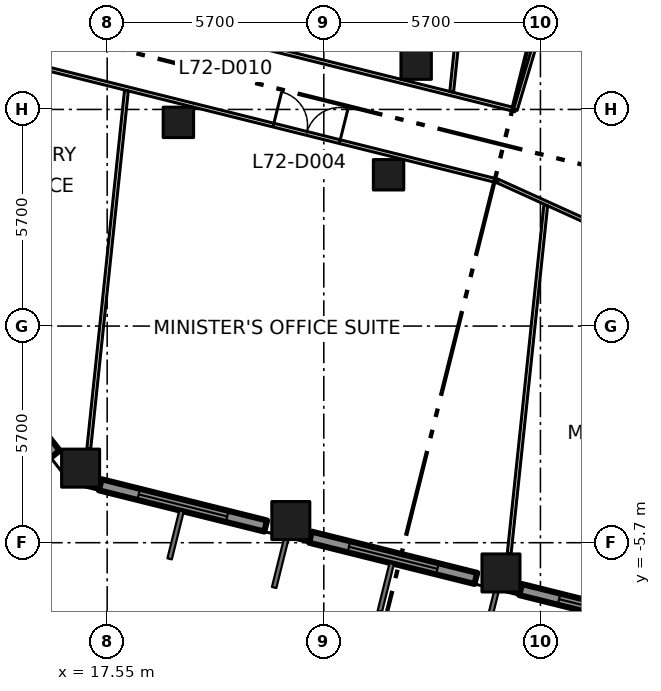
"""IFC4 building model, lengths in metres.
Left out: names, types, materials, properties, quantities, classifications, styles, units other than length and angle.
Written with IfcOpenShell. Run it as: python <this file> out.ifc"""

import sys

from ifc_helpers import new_model, si_unit, direction, frame, frame_2d, origin, origin_2d, place, context, subcontext, project, spatial, rectangle, extrude, element, fill, save


model = new_model("IFC4")
c1 = context("Model", 3, precision=1e-05, world=origin(), true_north=direction((0.0, 1.0)))
c2 = subcontext(c1, "Body", "Model", "MODEL_VIEW")
j1 = project(units=[si_unit("LENGTHUNIT", "METRE"), si_unit("PLANEANGLEUNIT", "RADIAN")], contexts=[c1])
p1 = place(None, origin())
s1 = spatial("IfcSite", under=j1, at=p1, CompositionType="ELEMENT")
p2 = place(p1, origin())
s2 = spatial("IfcBuilding", under=s1, at=p2, CompositionType="ELEMENT")
p3 = place(p2, frame((0.0, 0.0, 315.0)))
s3 = spatial("IfcBuildingStorey", under=s2, at=p3, CompositionType="ELEMENT", Elevation=315.0)
for number, where, z_axis, x_axis in (
    (1, (16.851, -3.738, 0.0), (0.0, 0.0, 1.0), (1.0, 0.0, 0.0)),
    (2, (22.382, -5.117, 0.0), (0.0, 0.0, 1.0), (1.0, 0.0, 0.0)),
    (3, (27.912, -6.496, 0.0), (0.0, 0.0, 1.0), (1.0, 0.0, 0.0)),
):
    element("IfcColumn", number, at=place(p3, frame(where, z_axis=z_axis, x_axis=x_axis)), inside=s3, PredefinedType="COLUMN", context=c2, shape_type="SweptSolid", body=[
        extrude(rectangle(XDim=1.0, YDim=1.0, at=origin_2d()), origin(), (0.0, 0.0, 1.0), 4.2),
    ])
for number, where, z_axis, x_axis in (
    (4, (19.424, 5.36, 0.0), (0.0, 0.0, 1.0), (1.0, 0.0, 0.0)),
    (5, (24.954, 3.981, 0.0), (0.0, 0.0, 1.0), (1.0, 0.0, 0.0)),
    (6, (25.68, 6.892, 0.0), (0.0, 0.0, 1.0), (1.0, 0.0, 0.0)),
):
    element("IfcColumn", number, at=place(p3, frame(where, z_axis=z_axis, x_axis=x_axis)), inside=s3, PredefinedType="COLUMN", context=c2, shape_type="SweptSolid", body=[
        extrude(rectangle(XDim=0.8, YDim=0.8, at=origin_2d()), origin(), (0.0, 0.0, 1.0), 4.2),
    ])
p4 = place(p3, frame((13.538, 0.016, 0.0), z_axis=(0.0, 0.0, 1.0), x_axis=(0.615713519567, -0.787970089421, 0.0)))
e7 = element("IfcWall", 7, at=p4, inside=s3, PredefinedType="SOLIDWALL", context=c2, shape_type="SweptSolid", body=[
    extrude(rectangle(XDim=4.296, YDim=0.3, at=frame_2d((2.148, 0.0))), origin(), (0.0, 0.0, 1.0), 3.2),
])
p5 = place(p4, frame((0.948, 0.0, 0.8)))
e8 = element("IfcOpeningElement", 8, at=p5, cuts=e7, PredefinedType="OPENING", context=c2, shape_type="SweptSolid", body=[
    extrude(rectangle(XDim=2.4, YDim=2.1, at=frame_2d((1.2, 1.05))), frame((0.0, 0.16, 0.0), z_axis=(0.0, -1.0, 0.0), x_axis=(1.0, 0.0, 0.0)), (0.0, 0.0, 1.0), 0.32),
])
p6 = place(p3, frame((17.367, -4.176, 0.0), z_axis=(0.0, 0.0, 1.0), x_axis=(0.970327846266, -0.241793032904, 0.0)))
e9 = element("IfcWall", 9, at=p6, inside=s3, PredefinedType="SOLIDWALL", context=c2, shape_type="SweptSolid", body=[
    extrude(rectangle(XDim=4.487, YDim=0.3, at=frame_2d((2.244, 0.0))), origin(), (0.0, 0.0, 1.0), 3.2),
])
p7 = place(p6, frame((1.044, 0.0, 0.8)))
e10 = element("IfcOpeningElement", 10, at=p7, cuts=e9, PredefinedType="OPENING", context=c2, shape_type="SweptSolid", body=[
    extrude(rectangle(XDim=2.4, YDim=2.1, at=frame_2d((1.2, 1.05))), frame((0.0, 0.16, 0.0), z_axis=(0.0, -1.0, 0.0), x_axis=(1.0, 0.0, 0.0)), (0.0, 0.0, 1.0), 0.32),
])
p8 = place(p3, frame((22.898, -5.555, 0.0), z_axis=(0.0, 0.0, 1.0), x_axis=(0.970315118421, -0.24184410467, 0.0)))
e11 = element("IfcWall", 11, at=p8, inside=s3, PredefinedType="SOLIDWALL", context=c2, shape_type="SweptSolid", body=[
    extrude(rectangle(XDim=4.486, YDim=0.3, at=frame_2d((2.243, 0.0))), origin(), (0.0, 0.0, 1.0), 3.2),
])
p9 = place(p8, frame((1.044, 0.0, 0.8)))
e12 = element("IfcOpeningElement", 12, at=p9, cuts=e11, PredefinedType="OPENING", context=c2, shape_type="SweptSolid", body=[
    extrude(rectangle(XDim=2.4, YDim=2.1, at=frame_2d((1.2, 1.05))), frame((0.0, 0.16, 0.0), z_axis=(0.0, -1.0, 0.0), x_axis=(1.0, 0.0, 0.0)), (0.0, 0.0, 1.0), 0.32),
])
p10 = place(p3, frame((28.428, -6.933, 0.0), z_axis=(0.0, 0.0, 1.0), x_axis=(0.970276766004, -0.241997928406, 0.0)))
e13 = element("IfcWall", 13, at=p10, inside=s3, PredefinedType="SOLIDWALL", context=c2, shape_type="SweptSolid", body=[
    extrude(rectangle(XDim=4.487, YDim=0.3, at=frame_2d((2.244, 0.0))), origin(), (0.0, 0.0, 1.0), 3.2),
])
p11 = place(p10, frame((1.044, 0.0, 0.8)))
e14 = element("IfcOpeningElement", 14, at=p11, cuts=e13, PredefinedType="OPENING", context=c2, shape_type="SweptSolid", body=[
    extrude(rectangle(XDim=2.4, YDim=2.1, at=frame_2d((1.2, 1.05))), frame((0.0, 0.16, 0.0), z_axis=(0.0, -1.0, 0.0), x_axis=(1.0, 0.0, 0.0)), (0.0, 0.0, 1.0), 0.32),
])
p12 = place(p3, frame((8.535, 8.626, 0.0), z_axis=(0.0, 0.0, 1.0), x_axis=(0.970298340477, -0.241911410372, 0.0)))
e15 = element("IfcWall", 15, at=p12, inside=s3, PredefinedType="PARTITIONING", context=c2, shape_type="SweptSolid", body=[
    extrude(rectangle(XDim=19.88, YDim=0.1, at=frame_2d((9.94, 0.0))), origin(), (0.0, 0.0, 1.0), 3.9),
])
p13 = place(p12, frame((13.799, 0.0, 0.0)))
e16 = element("IfcOpeningElement", 16, at=p13, cuts=e15, PredefinedType="OPENING", context=c2, shape_type="SweptSolid", body=[
    extrude(rectangle(XDim=1.8, YDim=2.1, at=frame_2d((0.9, 1.05))), frame((0.0, 0.06, 0.0), z_axis=(0.0, -1.0, 0.0), x_axis=(1.0, 0.0, 0.0)), (0.0, 0.0, 1.0), 0.12),
])
p14 = place(p12, frame((4.38, 0.0, 0.0)))
e17 = element("IfcOpeningElement", 17, at=p14, cuts=e15, PredefinedType="OPENING", context=c2, shape_type="SweptSolid", body=[
    extrude(rectangle(XDim=1.0, YDim=2.1, at=frame_2d((0.5, 1.05))), frame((0.0, 0.06, 0.0), z_axis=(0.0, -1.0, 0.0), x_axis=(1.0, 0.0, 0.0)), (0.0, 0.0, 1.0), 0.12),
])
p15 = place(p3, frame((9.002, 10.499, 0.0), z_axis=(0.0, 0.0, 1.0), x_axis=(0.970298340477, -0.241911410372, 0.0)))
e18 = element("IfcWall", 18, at=p15, inside=s3, PredefinedType="PARTITIONING", context=c2, shape_type="SweptSolid", body=[
    extrude(rectangle(XDim=19.88, YDim=0.1, at=frame_2d((9.94, 0.0))), origin(), (0.0, 0.0, 1.0), 3.9),
])
p16 = place(p15, frame((12.518, 0.0, 0.0)))
e19 = element("IfcOpeningElement", 19, at=p16, cuts=e18, PredefinedType="OPENING", context=c2, shape_type="SweptSolid", body=[
    extrude(rectangle(XDim=1.0, YDim=2.1, at=frame_2d((0.5, 1.05))), frame((0.0, 0.06, 0.0), z_axis=(0.0, -1.0, 0.0), x_axis=(1.0, 0.0, 0.0)), (0.0, 0.0, 1.0), 0.12),
])
p17 = place(p3, frame((27.824, 3.817, 0.0), z_axis=(0.0, 0.0, 1.0), x_axis=(0.910793734201, -0.41286168839, 0.0)))
e20 = element("IfcWall", 20, at=p17, inside=s3, PredefinedType="PARTITIONING", context=c2, shape_type="SweptSolid", body=[
    extrude(rectangle(XDim=2.482, YDim=0.1, at=frame_2d((1.241, 0.0))), origin(), (0.0, 0.0, 1.0), 3.9),
])
p18 = place(p3, frame((30.8, 14.1, 0.0), z_axis=(0.0, 0.0, 1.0), x_axis=(-0.28588265334, -0.958264633867, 0.0)))
e21 = element("IfcWall", 21, at=p18, inside=s3, PredefinedType="PARTITIONING", context=c2, shape_type="SweptSolid", body=[
    extrude(rectangle(XDim=8.776, YDim=0.1, at=frame_2d((4.388, 0.0))), origin(), (0.0, 0.0, 1.0), 3.9),
])
p19 = place(p18, frame((3.68, 0.0, 0.0)))
e22 = element("IfcOpeningElement", 22, at=p19, cuts=e21, PredefinedType="OPENING", context=c2, shape_type="SweptSolid", body=[
    extrude(rectangle(XDim=1.0, YDim=2.1, at=frame_2d((0.5, 1.05))), frame((0.0, 0.06, 0.0), z_axis=(0.0, -1.0, 0.0), x_axis=(1.0, 0.0, 0.0)), (0.0, 0.0, 1.0), 0.12),
])
p20 = place(p3, frame((17.065, -3.238, 0.0), z_axis=(0.0, 0.0, 1.0), x_axis=(0.104487801341, 0.994526168269, 0.0)))
e23 = element("IfcWall", 23, at=p20, inside=s3, PredefinedType="PARTITIONING", context=c2, shape_type="SweptSolid", body=[
    extrude(rectangle(XDim=9.484, YDim=0.1, at=frame_2d((4.742, 0.0))), origin(), (0.0, 0.0, 1.0), 3.9),
])
p21 = place(p3, frame((26.615, 6.166, 0.0), z_axis=(0.0, 0.0, 1.0), x_axis=(0.10453822663, 0.994520869149, 0.0)))
e24 = element("IfcWall", 24, at=p21, inside=s3, PredefinedType="PARTITIONING", context=c2, shape_type="SweptSolid", body=[
    extrude(rectangle(XDim=7.978, YDim=0.1, at=frame_2d((3.989, 0.0))), origin(), (0.0, 0.0, 1.0), 3.9),
])
p22 = place(p3, frame((28.127, -5.996, 0.0), z_axis=(0.0, 0.0, 1.0), x_axis=(0.104490376754, 0.994525897685, 0.0)))
e25 = element("IfcWall", 25, at=p22, inside=s3, PredefinedType="PARTITIONING", context=c2, shape_type="SweptSolid", body=[
    extrude(rectangle(XDim=9.218, YDim=0.1, at=frame_2d((4.609, 0.0))), origin(), (0.0, 0.0, 1.0), 3.9),
])
p23 = place(p7, origin())
e26 = element("IfcWindow", 26, at=p23, inside=s3, PartitioningType="DOUBLE_PANEL_VERTICAL", PredefinedType="WINDOW", context=c2, shape_type="SweptSolid", body=[
    extrude(rectangle(XDim=2.4, YDim=2.1, at=frame_2d((1.2, 1.05))), frame((0.0, 0.03, 0.0), z_axis=(0.0, -1.0, 0.0), x_axis=(1.0, 0.0, 0.0)), (0.0, 0.0, 1.0), 0.06),
])
fill(e10, e26)
p24 = place(p9, origin())
e27 = element("IfcWindow", 27, at=p24, inside=s3, PartitioningType="DOUBLE_PANEL_VERTICAL", PredefinedType="WINDOW", context=c2, shape_type="SweptSolid", body=[
    extrude(rectangle(XDim=2.4, YDim=2.1, at=frame_2d((1.2, 1.05))), frame((0.0, 0.03, 0.0), z_axis=(0.0, -1.0, 0.0), x_axis=(1.0, 0.0, 0.0)), (0.0, 0.0, 1.0), 0.06),
])
fill(e12, e27)
p25 = place(p11, origin())
e28 = element("IfcWindow", 28, at=p25, inside=s3, PartitioningType="DOUBLE_PANEL_VERTICAL", PredefinedType="WINDOW", context=c2, shape_type="SweptSolid", body=[
    extrude(rectangle(XDim=2.4, YDim=2.1, at=frame_2d((1.2, 1.05))), frame((0.0, 0.03, 0.0), z_axis=(0.0, -1.0, 0.0), x_axis=(1.0, 0.0, 0.0)), (0.0, 0.0, 1.0), 0.06),
])
fill(e14, e28)
p26 = place(p13, origin())
e29 = element("IfcDoor", 29, at=p26, inside=s3, OperationType="DOUBLE_DOOR_SINGLE_SWING", PredefinedType="DOOR", context=c2, shape_type="SweptSolid", body=[
    extrude(rectangle(XDim=1.8, YDim=2.1, at=frame_2d((0.9, 1.05))), frame((0.0, 0.025, 0.0), z_axis=(0.0, -1.0, 0.0), x_axis=(1.0, 0.0, 0.0)), (0.0, 0.0, 1.0), 0.05),
])
fill(e16, e29)
save(model, sys.argv[1])
